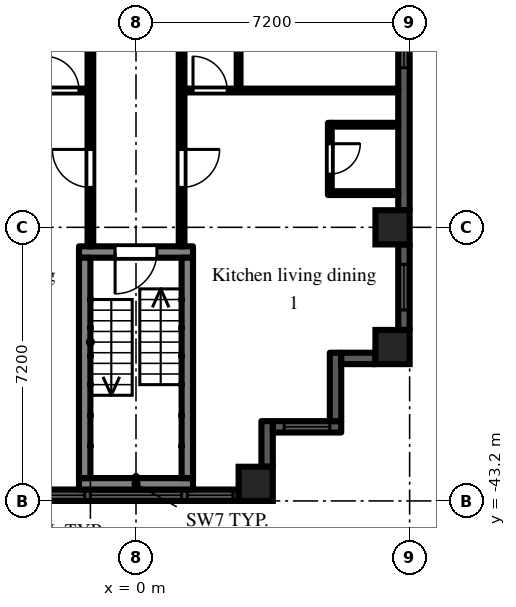
"""IFC4 building model, lengths in metres.
Left out: names, types, materials, properties, quantities, classifications, styles, units other than length and angle.
Written with IfcOpenShell. Run it as: python <this file> out.ifc"""

import sys

from ifc_helpers import new_model, si_unit, direction, frame, frame_2d, origin, origin_2d, place, context, subcontext, project, spatial, rectangle, extrude, element, fill, save


model = new_model("IFC4")
c1 = context("Model", 3, precision=1e-05, world=origin(), true_north=direction((0.0, 1.0)))
c2 = subcontext(c1, "Body", "Model", "MODEL_VIEW")
j1 = project(units=[si_unit("LENGTHUNIT", "METRE"), si_unit("PLANEANGLEUNIT", "RADIAN")], contexts=[c1])
p1 = place(None, origin())
s1 = spatial("IfcSite", under=j1, at=p1, CompositionType="ELEMENT")
p2 = place(p1, origin())
s2 = spatial("IfcBuilding", under=s1, at=p2, CompositionType="ELEMENT")
p3 = place(p2, frame((0.0, 0.0, 84.9)))
s3 = spatial("IfcBuildingStorey", under=s2, at=p3, CompositionType="ELEMENT", Elevation=84.9)
for number, where, z_axis, x_axis in (
    (1, (3.15, -42.75, 0.0), (0.0, 0.0, 1.0), (1.0, 0.0, 0.0)),
    (2, (6.75, -39.15, 0.0), (0.0, 0.0, 1.0), (1.0, 0.0, 0.0)),
    (3, (6.75, -36.0, 0.0), (0.0, 0.0, 1.0), (1.0, 0.0, 0.0)),
):
    element("IfcColumn", number, at=place(p3, frame(where, z_axis=z_axis, x_axis=x_axis)), inside=s3, PredefinedType="COLUMN", context=c2, shape_type="SweptSolid", body=[
        extrude(rectangle(XDim=0.9, YDim=0.9, at=origin_2d()), origin(), (0.0, 0.0, 1.0), 3.0),
    ])
p4 = place(p3, frame((-2.7, -43.05, 0.0), z_axis=(0.0, 0.0, 1.0), x_axis=(1.0, 0.0, 0.0)))
e4 = element("IfcWall", 4, at=p4, inside=s3, PredefinedType="SOLIDWALL", context=c2, shape_type="SweptSolid", body=[
    extrude(rectangle(XDim=5.4, YDim=0.3, at=frame_2d((2.7, 0.0))), origin(), (0.0, 0.0, 1.0), 2.1),
])
p5 = place(p4, frame((1.5, 0.0, 0.2)))
e5 = element("IfcOpeningElement", 5, at=p5, cuts=e4, PredefinedType="OPENING", context=c2, shape_type="SweptSolid", body=[
    extrude(rectangle(XDim=2.4, YDim=1.85, at=frame_2d((1.2, 0.925))), frame((0.0, 0.16, 0.0), z_axis=(0.0, -1.0, 0.0), x_axis=(1.0, 0.0, 0.0)), (0.0, 0.0, 1.0), 0.32),
])
p6 = place(p4, frame((0.15, 0.0, 0.2)))
e6 = element("IfcOpeningElement", 6, at=p6, cuts=e4, PredefinedType="OPENING", context=c2, shape_type="SweptSolid", body=[
    extrude(rectangle(XDim=1.2, YDim=1.85, at=frame_2d((0.6, 0.925))), frame((0.0, 0.16, 0.0), z_axis=(0.0, -1.0, 0.0), x_axis=(1.0, 0.0, 0.0)), (0.0, 0.0, 1.0), 0.32),
])
p7 = place(p4, frame((4.05, 0.0, 0.2)))
e7 = element("IfcOpeningElement", 7, at=p7, cuts=e4, PredefinedType="OPENING", context=c2, shape_type="SweptSolid", body=[
    extrude(rectangle(XDim=1.2, YDim=1.85, at=frame_2d((0.6, 0.925))), frame((0.0, 0.16, 0.0), z_axis=(0.0, -1.0, 0.0), x_axis=(1.0, 0.0, 0.0)), (0.0, 0.0, 1.0), 0.32),
])
p8 = place(p3, frame((3.45, -42.3, 0.0), z_axis=(0.0, 0.0, 1.0), x_axis=(0.0, 1.0, 0.0)))
e8 = element("IfcWall", 8, at=p8, inside=s3, PredefinedType="SOLIDWALL", context=c2, shape_type="SweptSolid", body=[
    extrude(rectangle(XDim=1.2, YDim=0.3, at=frame_2d((0.6, 0.0))), origin(), (0.0, 0.0, 1.0), 2.575),
])
p9 = place(p3, frame((3.6, -41.25, 0.0), z_axis=(0.0, 0.0, 1.0), x_axis=(1.0, 0.0, 0.0)))
e9 = element("IfcWall", 9, at=p9, inside=s3, PredefinedType="SOLIDWALL", context=c2, shape_type="SweptSolid", body=[
    extrude(rectangle(XDim=1.8, YDim=0.3, at=frame_2d((0.9, 0.0))), origin(), (0.0, 0.0, 1.0), 2.575),
])
p10 = place(p9, frame((0.3, 0.0, 0.2)))
e10 = element("IfcOpeningElement", 10, at=p10, cuts=e9, PredefinedType="OPENING", context=c2, shape_type="SweptSolid", body=[
    extrude(rectangle(XDim=1.2, YDim=1.85, at=frame_2d((0.6, 0.925))), frame((0.0, 0.16, 0.0), z_axis=(0.0, -1.0, 0.0), x_axis=(1.0, 0.0, 0.0)), (0.0, 0.0, 1.0), 0.32),
])
p11 = place(p3, frame((5.25, -41.1, 0.0), z_axis=(0.0, 0.0, 1.0), x_axis=(0.0, 1.0, 0.0)))
e11 = element("IfcWall", 11, at=p11, inside=s3, PredefinedType="SOLIDWALL", context=c2, shape_type="SweptSolid", body=[
    extrude(rectangle(XDim=1.8, YDim=0.3, at=frame_2d((0.9, 0.0))), origin(), (0.0, 0.0, 1.0), 2.575),
])
p12 = place(p3, frame((5.4, -39.45, 0.0), z_axis=(0.0, 0.0, 1.0), x_axis=(1.0, 0.0, 0.0)))
e12 = element("IfcWall", 12, at=p12, inside=s3, PredefinedType="SOLIDWALL", context=c2, shape_type="SweptSolid", body=[
    extrude(rectangle(XDim=0.9, YDim=0.3, at=frame_2d((0.45, 0.0))), origin(), (0.0, 0.0, 1.0), 2.575),
])
p13 = place(p3, frame((7.05, -38.7, 0.0), z_axis=(0.0, 0.0, 1.0), x_axis=(0.0, 1.0, 0.0)))
e13 = element("IfcWall", 13, at=p13, inside=s3, PredefinedType="SOLIDWALL", context=c2, shape_type="SweptSolid", body=[
    extrude(rectangle(XDim=2.25, YDim=0.3, at=frame_2d((1.125, 0.0))), origin(), (0.0, 0.0, 1.0), 2.1),
])
p14 = place(p13, frame((0.525, 0.0, 0.2)))
e14 = element("IfcOpeningElement", 14, at=p14, cuts=e13, PredefinedType="OPENING", context=c2, shape_type="SweptSolid", body=[
    extrude(rectangle(XDim=1.2, YDim=1.85, at=frame_2d((0.6, 0.925))), frame((0.0, 0.16, 0.0), z_axis=(0.0, -1.0, 0.0), x_axis=(1.0, 0.0, 0.0)), (0.0, 0.0, 1.0), 0.32),
])
p15 = place(p3, frame((7.05, -35.55, 0.0), z_axis=(0.0, 0.0, 1.0), x_axis=(0.0, 1.0, 0.0)))
e15 = element("IfcWall", 15, at=p15, inside=s3, PredefinedType="SOLIDWALL", context=c2, shape_type="SweptSolid", body=[
    extrude(rectangle(XDim=6.3, YDim=0.3, at=frame_2d((3.15, 0.0))), origin(), (0.0, 0.0, 1.0), 2.1),
])
p16 = place(p15, frame((3.75, 0.0, 0.2)))
e16 = element("IfcOpeningElement", 16, at=p16, cuts=e15, PredefinedType="OPENING", context=c2, shape_type="SweptSolid", body=[
    extrude(rectangle(XDim=2.4, YDim=1.85, at=frame_2d((1.2, 0.925))), frame((0.0, 0.16, 0.0), z_axis=(0.0, -1.0, 0.0), x_axis=(1.0, 0.0, 0.0)), (0.0, 0.0, 1.0), 0.32),
])
p17 = place(p3, frame((-1.5, -36.65, 0.0), z_axis=(0.0, 0.0, 1.0), x_axis=(1.0, 0.0, 0.0)))
e17 = element("IfcWall", 17, at=p17, inside=s3, PredefinedType="SHEAR", context=c2, shape_type="SweptSolid", body=[
    extrude(rectangle(XDim=3.0, YDim=0.3, at=frame_2d((1.5, 0.0))), origin(), (0.0, 0.0, 1.0), 2.575),
])
p18 = place(p17, frame((0.95, 0.0, 0.0)))
e18 = element("IfcOpeningElement", 18, at=p18, cuts=e17, PredefinedType="OPENING", context=c2, shape_type="SweptSolid", body=[
    extrude(rectangle(XDim=1.1, YDim=2.1, at=frame_2d((0.55, 1.05))), frame((0.0, 0.16, 0.0), z_axis=(0.0, -1.0, 0.0), x_axis=(1.0, 0.0, 0.0)), (0.0, 0.0, 1.0), 0.32),
])
p19 = place(p3, frame((-1.5, -42.75, 0.0), z_axis=(0.0, 0.0, 1.0), x_axis=(1.0, 0.0, 0.0)))
e19 = element("IfcWall", 19, at=p19, inside=s3, PredefinedType="SHEAR", context=c2, shape_type="SweptSolid", body=[
    extrude(rectangle(XDim=3.0, YDim=0.3, at=frame_2d((1.5, 0.0))), origin(), (0.0, 0.0, 1.0), 2.575),
])
for number, where, z_axis, x_axis in (
    (20, (-1.35, -36.8, 0.0), (0.0, 0.0, 1.0), (0.0, -1.0, 0.0)),
    (21, (1.35, -36.8, 0.0), (0.0, 0.0, 1.0), (0.0, -1.0, 0.0)),
):
    element("IfcWall", number, at=place(p3, frame(where, z_axis=z_axis, x_axis=x_axis)), inside=s3, PredefinedType="SHEAR", context=c2, shape_type="SweptSolid", body=[
        extrude(rectangle(XDim=5.8, YDim=0.3, at=frame_2d((2.9, 0.0))), origin(), (0.0, 0.0, 1.0), 2.575),
    ])
p20 = place(p3, frame((-6.9, -32.4, 0.0), z_axis=(0.0, 0.0, 1.0), x_axis=(1.0, 0.0, 0.0)))
e22 = element("IfcWall", 22, at=p20, inside=s3, PredefinedType="PARTITIONING", context=c2, shape_type="SweptSolid", body=[
    extrude(rectangle(XDim=5.625, YDim=0.1, at=frame_2d((2.812, 0.0))), origin(), (0.0, 0.0, 1.0), 2.575),
])
p21 = place(p20, frame((4.5, 0.0, 0.0)))
e23 = element("IfcOpeningElement", 23, at=p21, cuts=e22, PredefinedType="OPENING", context=c2, shape_type="SweptSolid", body=[
    extrude(rectangle(XDim=0.9, YDim=2.1, at=frame_2d((0.45, 1.05))), frame((0.0, 0.06, 0.0), z_axis=(0.0, -1.0, 0.0), x_axis=(1.0, 0.0, 0.0)), (0.0, 0.0, 1.0), 0.12),
])
p22 = place(p3, frame((-1.2, -36.5, 0.0), z_axis=(0.0, 0.0, 1.0), x_axis=(0.0, 1.0, 0.0)))
e24 = element("IfcWall", 24, at=p22, inside=s3, PredefinedType="PARTITIONING", context=c2, shape_type="SweptSolid", body=[
    extrude(rectangle(XDim=35.225, YDim=0.15, at=frame_2d((17.613, 0.0))), origin(), (0.0, 0.0, 1.0), 2.575),
])
p23 = place(p22, frame((30.75, 0.0, 0.0)))
e25 = element("IfcOpeningElement", 25, at=p23, cuts=e24, PredefinedType="OPENING", context=c2, shape_type="SweptSolid", body=[
    extrude(rectangle(XDim=0.9, YDim=2.1, at=frame_2d((0.45, 1.05))), frame((0.0, 0.085, 0.0), z_axis=(0.0, -1.0, 0.0), x_axis=(1.0, 0.0, 0.0)), (0.0, 0.0, 1.0), 0.17),
])
p24 = place(p22, frame((27.05, 0.0, 0.0)))
e26 = element("IfcOpeningElement", 26, at=p24, cuts=e24, PredefinedType="OPENING", context=c2, shape_type="SweptSolid", body=[
    extrude(rectangle(XDim=0.9, YDim=2.1, at=frame_2d((0.45, 1.05))), frame((0.0, 0.085, 0.0), z_axis=(0.0, -1.0, 0.0), x_axis=(1.0, 0.0, 0.0)), (0.0, 0.0, 1.0), 0.17),
])
p25 = place(p22, frame((19.85, 0.0, 0.0)))
e27 = element("IfcOpeningElement", 27, at=p25, cuts=e24, PredefinedType="OPENING", context=c2, shape_type="SweptSolid", body=[
    extrude(rectangle(XDim=0.9, YDim=2.1, at=frame_2d((0.45, 1.05))), frame((0.0, 0.085, 0.0), z_axis=(0.0, -1.0, 0.0), x_axis=(1.0, 0.0, 0.0)), (0.0, 0.0, 1.0), 0.17),
])
p26 = place(p22, frame((1.55, 0.0, 0.0)))
e28 = element("IfcOpeningElement", 28, at=p26, cuts=e24, PredefinedType="OPENING", context=c2, shape_type="SweptSolid", body=[
    extrude(rectangle(XDim=1.0, YDim=2.1, at=frame_2d((0.5, 1.05))), frame((0.0, 0.085, 0.0), z_axis=(0.0, -1.0, 0.0), x_axis=(1.0, 0.0, 0.0)), (0.0, 0.0, 1.0), 0.17),
])
p27 = place(p3, frame((1.2, -36.5, 0.0), z_axis=(0.0, 0.0, 1.0), x_axis=(0.0, 1.0, 0.0)))
e29 = element("IfcWall", 29, at=p27, inside=s3, PredefinedType="PARTITIONING", context=c2, shape_type="SweptSolid", body=[
    extrude(rectangle(XDim=35.375, YDim=0.15, at=frame_2d((17.688, 0.0))), origin(), (0.0, 0.0, 1.0), 2.575),
])
p28 = place(p27, frame((31.85, 0.0, 0.0)))
e30 = element("IfcOpeningElement", 30, at=p28, cuts=e29, PredefinedType="OPENING", context=c2, shape_type="SweptSolid", body=[
    extrude(rectangle(XDim=0.9, YDim=2.1, at=frame_2d((0.45, 1.05))), frame((0.0, 0.085, 0.0), z_axis=(0.0, -1.0, 0.0), x_axis=(1.0, 0.0, 0.0)), (0.0, 0.0, 1.0), 0.17),
])
p29 = place(p27, frame((23.05, 0.0, 0.0)))
e31 = element("IfcOpeningElement", 31, at=p29, cuts=e29, PredefinedType="OPENING", context=c2, shape_type="SweptSolid", body=[
    extrude(rectangle(XDim=0.9, YDim=2.1, at=frame_2d((0.45, 1.05))), frame((0.0, 0.085, 0.0), z_axis=(0.0, -1.0, 0.0), x_axis=(1.0, 0.0, 0.0)), (0.0, 0.0, 1.0), 0.17),
])
p30 = place(p27, frame((26.65, 0.0, 0.0)))
e32 = element("IfcOpeningElement", 32, at=p30, cuts=e29, PredefinedType="OPENING", context=c2, shape_type="SweptSolid", body=[
    extrude(rectangle(XDim=0.9, YDim=2.1, at=frame_2d((0.45, 1.05))), frame((0.0, 0.085, 0.0), z_axis=(0.0, -1.0, 0.0), x_axis=(1.0, 0.0, 0.0)), (0.0, 0.0, 1.0), 0.17),
])
p31 = place(p27, frame((20.5, 0.0, 0.0)))
e33 = element("IfcOpeningElement", 33, at=p31, cuts=e29, PredefinedType="OPENING", context=c2, shape_type="SweptSolid", body=[
    extrude(rectangle(XDim=1.0, YDim=2.1, at=frame_2d((0.5, 1.05))), frame((0.0, 0.085, 0.0), z_axis=(0.0, -1.0, 0.0), x_axis=(1.0, 0.0, 0.0)), (0.0, 0.0, 1.0), 0.17),
])
p32 = place(p27, frame((1.55, 0.0, 0.0)))
e34 = element("IfcOpeningElement", 34, at=p32, cuts=e29, PredefinedType="OPENING", context=c2, shape_type="SweptSolid", body=[
    extrude(rectangle(XDim=1.0, YDim=2.1, at=frame_2d((0.5, 1.05))), frame((0.0, 0.085, 0.0), z_axis=(0.0, -1.0, 0.0), x_axis=(1.0, 0.0, 0.0)), (0.0, 0.0, 1.0), 0.17),
])
p33 = place(p3, frame((1.275, -32.4, 0.0), z_axis=(0.0, 0.0, 1.0), x_axis=(1.0, 0.0, 0.0)))
e35 = element("IfcWall", 35, at=p33, inside=s3, PredefinedType="PARTITIONING", context=c2, shape_type="SweptSolid", body=[
    extrude(rectangle(XDim=5.625, YDim=0.1, at=frame_2d((2.812, 0.0))), origin(), (0.0, 0.0, 1.0), 2.575),
])
p34 = place(p33, frame((0.225, 0.0, 0.0)))
e36 = element("IfcOpeningElement", 36, at=p34, cuts=e35, PredefinedType="OPENING", context=c2, shape_type="SweptSolid", body=[
    extrude(rectangle(XDim=0.9, YDim=2.1, at=frame_2d((0.45, 1.05))), frame((0.0, 0.06, 0.0), z_axis=(0.0, -1.0, 0.0), x_axis=(1.0, 0.0, 0.0)), (0.0, 0.0, 1.0), 0.12),
])
p35 = place(p3, frame((2.7, -32.35, 0.0), z_axis=(0.0, 0.0, 1.0), x_axis=(0.0, 1.0, 0.0)))
e37 = element("IfcWall", 37, at=p35, inside=s3, PredefinedType="PARTITIONING", context=c2, shape_type="SweptSolid", body=[
    extrude(rectangle(XDim=14.25, YDim=0.1, at=frame_2d((7.125, 0.0))), origin(), (0.0, 0.0, 1.0), 2.575),
])
p36 = place(p35, frame((1.12, 0.0, 0.0)))
e38 = element("IfcOpeningElement", 38, at=p36, cuts=e37, PredefinedType="OPENING", context=c2, shape_type="SweptSolid", body=[
    extrude(rectangle(XDim=0.9, YDim=2.1, at=frame_2d((0.45, 1.05))), frame((0.0, 0.06, 0.0), z_axis=(0.0, -1.0, 0.0), x_axis=(1.0, 0.0, 0.0)), (0.0, 0.0, 1.0), 0.12),
])
p37 = place(p35, frame((12.28, 0.0, 0.0)))
e39 = element("IfcOpeningElement", 39, at=p37, cuts=e37, PredefinedType="OPENING", context=c2, shape_type="SweptSolid", body=[
    extrude(rectangle(XDim=0.9, YDim=2.1, at=frame_2d((0.45, 1.05))), frame((0.0, 0.06, 0.0), z_axis=(0.0, -1.0, 0.0), x_axis=(1.0, 0.0, 0.0)), (0.0, 0.0, 1.0), 0.12),
])
p38 = place(p3, frame((5.1, -35.15, 0.0), z_axis=(0.0, 0.0, 1.0), x_axis=(0.0, 1.0, 0.0)))
e40 = element("IfcWall", 40, at=p38, inside=s3, PredefinedType="PARTITIONING", context=c2, shape_type="SweptSolid", body=[
    extrude(rectangle(XDim=1.9, YDim=0.1, at=frame_2d((0.95, 0.0))), origin(), (0.0, 0.0, 1.0), 2.575),
])
p39 = place(p38, frame((0.55, 0.0, 0.0)))
e41 = element("IfcOpeningElement", 41, at=p39, cuts=e40, PredefinedType="OPENING", context=c2, shape_type="SweptSolid", body=[
    extrude(rectangle(XDim=0.8, YDim=2.1, at=frame_2d((0.4, 1.05))), frame((0.0, 0.06, 0.0), z_axis=(0.0, -1.0, 0.0), x_axis=(1.0, 0.0, 0.0)), (0.0, 0.0, 1.0), 0.12),
])
for number, where, z_axis, x_axis in (
    (42, (5.15, -35.1, 0.0), (0.0, 0.0, 1.0), (1.0, 0.0, 0.0)),
    (43, (5.15, -33.3, 0.0), (0.0, 0.0, 1.0), (1.0, 0.0, 0.0)),
):
    element("IfcWall", number, at=place(p3, frame(where, z_axis=z_axis, x_axis=x_axis)), inside=s3, PredefinedType="PARTITIONING", context=c2, shape_type="SweptSolid", body=[
        extrude(rectangle(XDim=1.75, YDim=0.1, at=frame_2d((0.875, 0.0))), origin(), (0.0, 0.0, 1.0), 2.575),
    ])
p40 = place(p5, origin())
e44 = element("IfcWindow", 44, at=p40, inside=s3, PartitioningType="SINGLE_PANEL", PredefinedType="WINDOW", context=c2, shape_type="SweptSolid", body=[
    extrude(rectangle(XDim=2.4, YDim=1.85, at=frame_2d((1.2, 0.925))), frame((0.0, 0.03, 0.0), z_axis=(0.0, -1.0, 0.0), x_axis=(1.0, 0.0, 0.0)), (0.0, 0.0, 1.0), 0.06),
])
fill(e5, e44)
p41 = place(p6, origin())
e45 = element("IfcWindow", 45, at=p41, inside=s3, PartitioningType="SINGLE_PANEL", PredefinedType="WINDOW", context=c2, shape_type="SweptSolid", body=[
    extrude(rectangle(XDim=1.2, YDim=1.85, at=frame_2d((0.6, 0.925))), frame((0.0, 0.03, 0.0), z_axis=(0.0, -1.0, 0.0), x_axis=(1.0, 0.0, 0.0)), (0.0, 0.0, 1.0), 0.06),
])
fill(e6, e45)
p42 = place(p7, origin())
e46 = element("IfcWindow", 46, at=p42, inside=s3, PartitioningType="SINGLE_PANEL", PredefinedType="WINDOW", context=c2, shape_type="SweptSolid", body=[
    extrude(rectangle(XDim=1.2, YDim=1.85, at=frame_2d((0.6, 0.925))), frame((0.0, 0.03, 0.0), z_axis=(0.0, -1.0, 0.0), x_axis=(1.0, 0.0, 0.0)), (0.0, 0.0, 1.0), 0.06),
])
fill(e7, e46)
p43 = place(p10, origin())
e47 = element("IfcWindow", 47, at=p43, inside=s3, PartitioningType="SINGLE_PANEL", PredefinedType="WINDOW", context=c2, shape_type="SweptSolid", body=[
    extrude(rectangle(XDim=1.2, YDim=1.85, at=frame_2d((0.6, 0.925))), frame((0.0, 0.03, 0.0), z_axis=(0.0, -1.0, 0.0), x_axis=(1.0, 0.0, 0.0)), (0.0, 0.0, 1.0), 0.06),
])
fill(e10, e47)
p44 = place(p14, origin())
e48 = element("IfcWindow", 48, at=p44, inside=s3, PartitioningType="SINGLE_PANEL", PredefinedType="WINDOW", context=c2, shape_type="SweptSolid", body=[
    extrude(rectangle(XDim=1.2, YDim=1.85, at=frame_2d((0.6, 0.925))), frame((0.0, 0.03, 0.0), z_axis=(0.0, -1.0, 0.0), x_axis=(1.0, 0.0, 0.0)), (0.0, 0.0, 1.0), 0.06),
])
fill(e14, e48)
p45 = place(p16, origin())
e49 = element("IfcWindow", 49, at=p45, inside=s3, PartitioningType="SINGLE_PANEL", PredefinedType="WINDOW", context=c2, shape_type="SweptSolid", body=[
    extrude(rectangle(XDim=2.4, YDim=1.85, at=frame_2d((1.2, 0.925))), frame((0.0, 0.03, 0.0), z_axis=(0.0, -1.0, 0.0), x_axis=(1.0, 0.0, 0.0)), (0.0, 0.0, 1.0), 0.06),
])
fill(e16, e49)
p46 = place(p18, frame((1.1, 0.0, 0.0), z_axis=(0.0, 0.0, 1.0), x_axis=(-1.0, 0.0, 0.0)))
e50 = element("IfcDoor", 50, at=p46, inside=s3, OperationType="SINGLE_SWING_RIGHT", PredefinedType="DOOR", context=c2, shape_type="SweptSolid", body=[
    extrude(rectangle(XDim=1.1, YDim=2.1, at=frame_2d((0.55, 1.05))), frame((0.0, 0.025, 0.0), z_axis=(0.0, -1.0, 0.0), x_axis=(1.0, 0.0, 0.0)), (0.0, 0.0, 1.0), 0.05),
])
fill(e18, e50)
p47 = place(p39, frame((0.8, 0.0, 0.0), z_axis=(0.0, 0.0, 1.0), x_axis=(-1.0, 0.0, 0.0)))
e51 = element("IfcDoor", 51, at=p47, inside=s3, OperationType="SINGLE_SWING_LEFT", PredefinedType="DOOR", context=c2, shape_type="SweptSolid", body=[
    extrude(rectangle(XDim=0.8, YDim=2.1, at=frame_2d((0.4, 1.05))), frame((0.0, 0.025, 0.0), z_axis=(0.0, -1.0, 0.0), x_axis=(1.0, 0.0, 0.0)), (0.0, 0.0, 1.0), 0.05),
])
fill(e41, e51)
p48 = place(p32, frame((1.0, 0.0, 0.0), z_axis=(0.0, 0.0, 1.0), x_axis=(-1.0, 0.0, 0.0)))
e52 = element("IfcDoor", 52, at=p48, inside=s3, OperationType="SINGLE_SWING_LEFT", PredefinedType="DOOR", context=c2, shape_type="SweptSolid", body=[
    extrude(rectangle(XDim=1.0, YDim=2.1, at=frame_2d((0.5, 1.05))), frame((0.0, 0.025, 0.0), z_axis=(0.0, -1.0, 0.0), x_axis=(1.0, 0.0, 0.0)), (0.0, 0.0, 1.0), 0.05),
])
fill(e34, e52)
p49 = place(p34, origin())
e53 = element("IfcDoor", 53, at=p49, inside=s3, OperationType="SINGLE_SWING_LEFT", PredefinedType="DOOR", context=c2, shape_type="SweptSolid", body=[
    extrude(rectangle(XDim=0.9, YDim=2.1, at=frame_2d((0.45, 1.05))), frame((0.0, 0.025, 0.0), z_axis=(0.0, -1.0, 0.0), x_axis=(1.0, 0.0, 0.0)), (0.0, 0.0, 1.0), 0.05),
])
fill(e36, e53)
p50 = place(p26, origin())
e54 = element("IfcDoor", 54, at=p50, inside=s3, OperationType="SINGLE_SWING_RIGHT", PredefinedType="DOOR", context=c2, shape_type="SweptSolid", body=[
    extrude(rectangle(XDim=1.0, YDim=2.1, at=frame_2d((0.5, 1.05))), frame((0.0, 0.025, 0.0), z_axis=(0.0, -1.0, 0.0), x_axis=(1.0, 0.0, 0.0)), (0.0, 0.0, 1.0), 0.05),
])
fill(e28, e54)
p51 = place(p21, origin())
e55 = element("IfcDoor", 55, at=p51, inside=s3, OperationType="SINGLE_SWING_LEFT", PredefinedType="DOOR", context=c2, shape_type="SweptSolid", body=[
    extrude(rectangle(XDim=0.9, YDim=2.1, at=frame_2d((0.45, 1.05))), frame((0.0, 0.025, 0.0), z_axis=(0.0, -1.0, 0.0), x_axis=(1.0, 0.0, 0.0)), (0.0, 0.0, 1.0), 0.05),
])
fill(e23, e55)
save(model, sys.argv[1])
